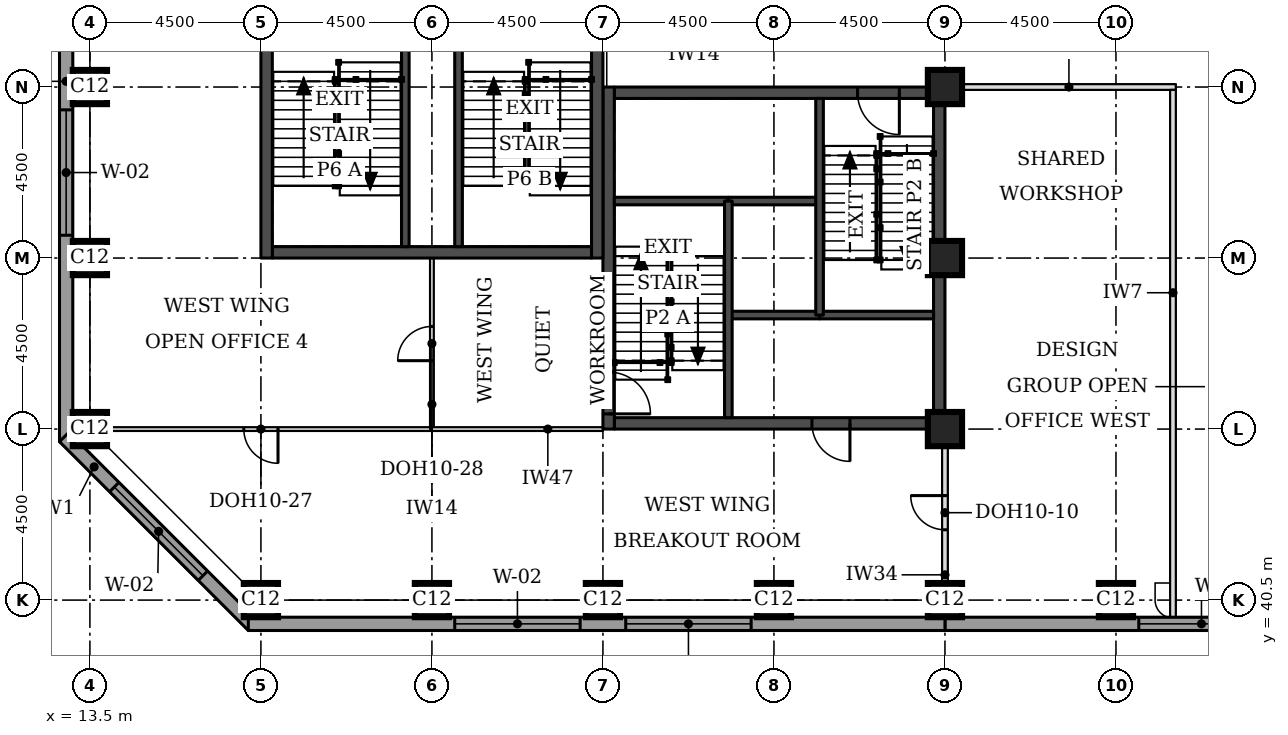
"""IFC4 building model, lengths in metres.
Left out: names, types, materials, properties, quantities, classifications, styles, units other than length and angle.
Written with IfcOpenShell. Run it as: python <this file> out.ifc"""

import sys

from ifc_helpers import new_model, si_unit, direction, frame, frame_2d, origin, origin_2d, place, context, subcontext, project, spatial, rectangle, extrude, element, fill, save


model = new_model("IFC4")
c1 = context("Model", 3, precision=1e-05, world=origin(), true_north=direction((0.0, 1.0)))
c2 = subcontext(c1, "Body", "Model", "MODEL_VIEW")
j1 = project(units=[si_unit("LENGTHUNIT", "METRE"), si_unit("PLANEANGLEUNIT", "RADIAN")], contexts=[c1])
p1 = place(None, origin())
s1 = spatial("IfcSite", under=j1, at=p1, CompositionType="ELEMENT")
p2 = place(p1, origin())
s2 = spatial("IfcBuilding", under=s1, at=p2, CompositionType="ELEMENT")
p3 = place(p2, frame((0.0, 0.0, 223.0)))
s3 = spatial("IfcBuildingStorey", under=s2, at=p3, CompositionType="ELEMENT", Elevation=223.0)
for number, where, z_axis, x_axis in (
    (1, (18.0, 40.5, 0.0), (0.0, 0.0, 1.0), (1.0, 0.0, 0.0)),
    (2, (22.5, 40.5, 0.0), (0.0, 0.0, 1.0), (1.0, 0.0, 0.0)),
    (3, (27.0, 40.5, 0.0), (0.0, 0.0, 1.0), (1.0, 0.0, 0.0)),
    (4, (31.5, 40.5, 0.0), (0.0, 0.0, 1.0), (1.0, 0.0, 0.0)),
    (5, (36.0, 40.5, 0.0), (0.0, 0.0, 1.0), (1.0, 0.0, 0.0)),
    (6, (40.5, 40.5, 0.0), (0.0, 0.0, 1.0), (1.0, 0.0, 0.0)),
    (7, (13.5, 45.0, 0.0), (0.0, 0.0, 1.0), (1.0, 0.0, 0.0)),
    (8, (36.0, 45.0, 0.0), (0.0, 0.0, 1.0), (1.0, 0.0, 0.0)),
    (9, (13.5, 49.5, 0.0), (0.0, 0.0, 1.0), (1.0, 0.0, 0.0)),
    (10, (36.0, 49.5, 0.0), (0.0, 0.0, 1.0), (1.0, 0.0, 0.0)),
    (11, (13.5, 54.0, 0.0), (0.0, 0.0, 1.0), (1.0, 0.0, 0.0)),
    (12, (36.0, 54.0, 0.0), (0.0, 0.0, 1.0), (1.0, 0.0, 0.0)),
):
    element("IfcColumn", number, at=place(p3, frame(where, z_axis=z_axis, x_axis=x_axis)), inside=s3, PredefinedType="COLUMN", context=c2, shape_type="SweptSolid", body=[
        extrude(rectangle(XDim=0.9, YDim=0.9, at=origin_2d()), origin(), (0.0, 0.0, 1.0), 3.7),
    ])
p4 = place(p3, frame((27.3, 45.15, 0.0), z_axis=(0.0, 0.0, 1.0), x_axis=(1.0, 0.0, 0.0)))
e13 = element("IfcWall", 13, at=p4, inside=s3, PredefinedType="SHEAR", context=c2, shape_type="SweptSolid", body=[
    extrude(rectangle(XDim=8.4, YDim=0.3, at=frame_2d((4.2, 0.0))), origin(), (0.0, 0.0, 1.0), 3.7),
])
p5 = place(p4, frame((5.2, 0.0, 0.0)))
e14 = element("IfcOpeningElement", 14, at=p5, cuts=e13, PredefinedType="OPENING", context=c2, shape_type="SweptSolid", body=[
    extrude(rectangle(XDim=1.0, YDim=2.1, at=frame_2d((0.5, 1.05))), frame((0.0, 0.16, 0.0), z_axis=(0.0, -1.0, 0.0), x_axis=(1.0, 0.0, 0.0)), (0.0, 0.0, 1.0), 0.32),
])
p6 = place(p3, frame((27.3, 53.85, 0.0), z_axis=(0.0, 0.0, 1.0), x_axis=(1.0, 0.0, 0.0)))
e15 = element("IfcWall", 15, at=p6, inside=s3, PredefinedType="SHEAR", context=c2, shape_type="SweptSolid", body=[
    extrude(rectangle(XDim=8.4, YDim=0.3, at=frame_2d((4.2, 0.0))), origin(), (0.0, 0.0, 1.0), 3.7),
])
p7 = place(p6, frame((6.4, 0.0, 0.0)))
e16 = element("IfcOpeningElement", 16, at=p7, cuts=e15, PredefinedType="OPENING", context=c2, shape_type="SweptSolid", body=[
    extrude(rectangle(XDim=1.1, YDim=2.1, at=frame_2d((0.55, 1.05))), frame((0.0, 0.16, 0.0), z_axis=(0.0, -1.0, 0.0), x_axis=(1.0, 0.0, 0.0)), (0.0, 0.0, 1.0), 0.32),
])
p8 = place(p3, frame((27.15, 45.0, 0.0), z_axis=(0.0, 0.0, 1.0), x_axis=(0.0, 1.0, 0.0)))
e17 = element("IfcWall", 17, at=p8, inside=s3, PredefinedType="SHEAR", context=c2, shape_type="SweptSolid", body=[
    extrude(rectangle(XDim=9.0, YDim=0.3, at=frame_2d((4.5, 0.0))), origin(), (0.0, 0.0, 1.0), 3.7),
])
p9 = place(p8, frame((0.4, 0.0, 0.0)))
e18 = element("IfcOpeningElement", 18, at=p9, cuts=e17, PredefinedType="OPENING", context=c2, shape_type="SweptSolid", body=[
    extrude(rectangle(XDim=1.1, YDim=2.1, at=frame_2d((0.55, 1.05))), frame((0.0, 0.16, 0.0), z_axis=(0.0, -1.0, 0.0), x_axis=(1.0, 0.0, 0.0)), (0.0, 0.0, 1.0), 0.32),
])
p10 = place(p3, frame((35.85, 45.0, 0.0), z_axis=(0.0, 0.0, 1.0), x_axis=(0.0, 1.0, 0.0)))
e19 = element("IfcWall", 19, at=p10, inside=s3, PredefinedType="SHEAR", context=c2, shape_type="SweptSolid", body=[
    extrude(rectangle(XDim=9.0, YDim=0.3, at=frame_2d((4.5, 0.0))), origin(), (0.0, 0.0, 1.0), 3.7),
])
p11 = place(p3, frame((18.3, 49.65, 0.0), z_axis=(0.0, 0.0, 1.0), x_axis=(1.0, 0.0, 0.0)))
e20 = element("IfcWall", 20, at=p11, inside=s3, PredefinedType="SHEAR", context=c2, shape_type="SweptSolid", body=[
    extrude(rectangle(XDim=8.4, YDim=0.3, at=frame_2d((4.2, 0.0))), origin(), (0.0, 0.0, 1.0), 3.7),
])
p12 = place(p3, frame((18.15, 49.5, 0.0), z_axis=(0.0, 0.0, 1.0), x_axis=(0.0, 1.0, 0.0)))
e21 = element("IfcWall", 21, at=p12, inside=s3, PredefinedType="SHEAR", context=c2, shape_type="SweptSolid", body=[
    extrude(rectangle(XDim=9.0, YDim=0.3, at=frame_2d((4.5, 0.0))), origin(), (0.0, 0.0, 1.0), 3.7),
])
p13 = place(p3, frame((26.85, 49.5, 0.0), z_axis=(0.0, 0.0, 1.0), x_axis=(0.0, 1.0, 0.0)))
e22 = element("IfcWall", 22, at=p13, inside=s3, PredefinedType="SHEAR", context=c2, shape_type="SweptSolid", body=[
    extrude(rectangle(XDim=9.0, YDim=0.3, at=frame_2d((4.5, 0.0))), origin(), (0.0, 0.0, 1.0), 3.7),
])
p14 = place(p13, frame((6.6, 0.0, 0.0)))
e23 = element("IfcOpeningElement", 23, at=p14, cuts=e22, PredefinedType="OPENING", context=c2, shape_type="SweptSolid", body=[
    extrude(rectangle(XDim=1.8, YDim=2.1, at=frame_2d((0.9, 1.05))), frame((0.0, 0.16, 0.0), z_axis=(0.0, -1.0, 0.0), x_axis=(1.0, 0.0, 0.0)), (0.0, 0.0, 1.0), 0.32),
])
p15 = place(p3, frame((36.0, 39.875, 0.0), z_axis=(0.0, 0.0, 1.0), x_axis=(1.0, 0.0, 0.0)))
e24 = element("IfcWall", 24, at=p15, inside=s3, PredefinedType="STANDARD", context=c2, shape_type="SweptSolid", body=[
    extrude(rectangle(XDim=36.331, YDim=0.35, at=frame_2d((18.166, 0.0))), origin(), (0.0, 0.0, 1.0), 3.525),
])
p16 = place(p15, frame((5.1, 0.0, 0.9)))
e25 = element("IfcOpeningElement", 25, at=p16, cuts=e24, PredefinedType="OPENING", context=c2, shape_type="SweptSolid", body=[
    extrude(rectangle(XDim=3.3, YDim=1.9, at=frame_2d((1.65, 0.95))), frame((0.0, 0.185, 0.0), z_axis=(0.0, -1.0, 0.0), x_axis=(1.0, 0.0, 0.0)), (0.0, 0.0, 1.0), 0.37),
])
p17 = place(p15, frame((9.6, 0.0, 0.9)))
e26 = element("IfcOpeningElement", 26, at=p17, cuts=e24, PredefinedType="OPENING", context=c2, shape_type="SweptSolid", body=[
    extrude(rectangle(XDim=3.3, YDim=1.9, at=frame_2d((1.65, 0.95))), frame((0.0, 0.185, 0.0), z_axis=(0.0, -1.0, 0.0), x_axis=(1.0, 0.0, 0.0)), (0.0, 0.0, 1.0), 0.37),
])
p18 = place(p15, frame((14.1, 0.0, 0.9)))
e27 = element("IfcOpeningElement", 27, at=p18, cuts=e24, PredefinedType="OPENING", context=c2, shape_type="SweptSolid", body=[
    extrude(rectangle(XDim=3.3, YDim=1.9, at=frame_2d((1.65, 0.95))), frame((0.0, 0.185, 0.0), z_axis=(0.0, -1.0, 0.0), x_axis=(1.0, 0.0, 0.0)), (0.0, 0.0, 1.0), 0.37),
])
p19 = place(p15, frame((18.6, 0.0, 0.9)))
e28 = element("IfcOpeningElement", 28, at=p19, cuts=e24, PredefinedType="OPENING", context=c2, shape_type="SweptSolid", body=[
    extrude(rectangle(XDim=3.3, YDim=1.9, at=frame_2d((1.65, 0.95))), frame((0.0, 0.185, 0.0), z_axis=(0.0, -1.0, 0.0), x_axis=(1.0, 0.0, 0.0)), (0.0, 0.0, 1.0), 0.37),
])
p20 = place(p15, frame((23.1, 0.0, 0.9)))
e29 = element("IfcOpeningElement", 29, at=p20, cuts=e24, PredefinedType="OPENING", context=c2, shape_type="SweptSolid", body=[
    extrude(rectangle(XDim=3.3, YDim=1.9, at=frame_2d((1.65, 0.95))), frame((0.0, 0.185, 0.0), z_axis=(0.0, -1.0, 0.0), x_axis=(1.0, 0.0, 0.0)), (0.0, 0.0, 1.0), 0.37),
])
p21 = place(p15, frame((27.6, 0.0, 0.9)))
e30 = element("IfcOpeningElement", 30, at=p21, cuts=e24, PredefinedType="OPENING", context=c2, shape_type="SweptSolid", body=[
    extrude(rectangle(XDim=3.3, YDim=1.9, at=frame_2d((1.65, 0.95))), frame((0.0, 0.185, 0.0), z_axis=(0.0, -1.0, 0.0), x_axis=(1.0, 0.0, 0.0)), (0.0, 0.0, 1.0), 0.37),
])
p22 = place(p3, frame((12.875, 58.831, 0.0), z_axis=(0.0, 0.0, 1.0), x_axis=(0.0, -1.0, 0.0)))
e31 = element("IfcWall", 31, at=p22, inside=s3, PredefinedType="STANDARD", context=c2, shape_type="SweptSolid", body=[
    extrude(rectangle(XDim=14.163, YDim=0.35, at=frame_2d((7.081, 0.0))), origin(), (0.0, 0.0, 1.0), 3.525),
])
p23 = place(p22, frame((5.431, 0.0, 0.9)))
e32 = element("IfcOpeningElement", 32, at=p23, cuts=e31, PredefinedType="OPENING", context=c2, shape_type="SweptSolid", body=[
    extrude(rectangle(XDim=3.3, YDim=1.9, at=frame_2d((1.65, 0.95))), frame((0.0, 0.185, 0.0), z_axis=(0.0, -1.0, 0.0), x_axis=(1.0, 0.0, 0.0)), (0.0, 0.0, 1.0), 0.37),
])
p24 = place(p3, frame((12.824, 44.792, 0.0), z_axis=(0.0, 0.0, 1.0), x_axis=(0.707106781187, -0.707106781187, 0.0)))
e33 = element("IfcWall", 33, at=p24, inside=s3, PredefinedType="STANDARD", context=c2, shape_type="SweptSolid", body=[
    extrude(rectangle(XDim=7.027, YDim=0.35, at=frame_2d((3.513, 0.0))), origin(), (0.0, 0.0, 1.0), 3.525),
])
p25 = place(p24, frame((1.863, 0.0, 0.9)))
e34 = element("IfcOpeningElement", 34, at=p25, cuts=e33, PredefinedType="OPENING", context=c2, shape_type="SweptSolid", body=[
    extrude(rectangle(XDim=3.3, YDim=1.9, at=frame_2d((1.65, 0.95))), frame((0.0, 0.185, 0.0), z_axis=(0.0, -1.0, 0.0), x_axis=(1.0, 0.0, 0.0)), (0.0, 0.0, 1.0), 0.37),
])
p26 = place(p3, frame((17.669, 39.875, 0.0), z_axis=(0.0, 0.0, 1.0), x_axis=(1.0, 0.0, 0.0)))
e35 = element("IfcWall", 35, at=p26, inside=s3, PredefinedType="STANDARD", context=c2, shape_type="SweptSolid", body=[
    extrude(rectangle(XDim=18.331, YDim=0.35, at=frame_2d((9.166, 0.0))), origin(), (0.0, 0.0, 1.0), 3.525),
])
p27 = place(p26, frame((5.431, 0.0, 0.9)))
e36 = element("IfcOpeningElement", 36, at=p27, cuts=e35, PredefinedType="OPENING", context=c2, shape_type="SweptSolid", body=[
    extrude(rectangle(XDim=3.3, YDim=1.9, at=frame_2d((1.65, 0.95))), frame((0.0, 0.185, 0.0), z_axis=(0.0, -1.0, 0.0), x_axis=(1.0, 0.0, 0.0)), (0.0, 0.0, 1.0), 0.37),
])
p28 = place(p26, frame((9.931, 0.0, 0.9)))
e37 = element("IfcOpeningElement", 37, at=p28, cuts=e35, PredefinedType="OPENING", context=c2, shape_type="SweptSolid", body=[
    extrude(rectangle(XDim=3.3, YDim=1.9, at=frame_2d((1.65, 0.95))), frame((0.0, 0.185, 0.0), z_axis=(0.0, -1.0, 0.0), x_axis=(1.0, 0.0, 0.0)), (0.0, 0.0, 1.0), 0.37),
])
p29 = place(p3, frame((36.45, 54.0, 0.0), z_axis=(0.0, 0.0, 1.0), x_axis=(1.0, 0.0, 0.0)))
e38 = element("IfcWall", 38, at=p29, inside=s3, PredefinedType="PARTITIONING", context=c2, shape_type="SweptSolid", body=[
    extrude(rectangle(XDim=5.625, YDim=0.15, at=frame_2d((2.812, 0.0))), origin(), (0.0, 0.0, 1.0), 3.55),
])
p30 = place(p3, frame((42.0, 40.05, 0.0), z_axis=(0.0, 0.0, 1.0), x_axis=(0.0, 1.0, 0.0)))
e39 = element("IfcWall", 39, at=p30, inside=s3, PredefinedType="PARTITIONING", context=c2, shape_type="SweptSolid", body=[
    extrude(rectangle(XDim=13.875, YDim=0.15, at=frame_2d((6.938, 0.0))), origin(), (0.0, 0.0, 1.0), 3.55),
])
p31 = place(p3, frame((36.0, 40.95, 0.0), z_axis=(0.0, 0.0, 1.0), x_axis=(0.0, 1.0, 0.0)))
e40 = element("IfcWall", 40, at=p31, inside=s3, PredefinedType="PARTITIONING", context=c2, shape_type="SweptSolid", body=[
    extrude(rectangle(XDim=3.63, YDim=0.15, at=frame_2d((1.815, 0.0))), origin(), (0.0, 0.0, 1.0), 2.8),
])
p32 = place(p31, frame((1.4, 0.0, 0.0)))
e41 = element("IfcOpeningElement", 41, at=p32, cuts=e40, PredefinedType="OPENING", context=c2, shape_type="SweptSolid", body=[
    extrude(rectangle(XDim=0.9, YDim=2.1, at=frame_2d((0.45, 1.05))), frame((0.0, 0.085, 0.0), z_axis=(0.0, -1.0, 0.0), x_axis=(1.0, 0.0, 0.0)), (0.0, 0.0, 1.0), 0.17),
])
p33 = place(p3, frame((22.5, 45.0, 0.0), z_axis=(0.0, 0.0, 1.0), x_axis=(-1.0, 0.0, 0.0)))
e42 = element("IfcWall", 42, at=p33, inside=s3, PredefinedType="PARTITIONING", context=c2, shape_type="SweptSolid", body=[
    extrude(rectangle(XDim=9.0, YDim=0.1, at=frame_2d((4.5, 0.0))), origin(), (0.0, 0.0, 1.0), 2.55),
])
p34 = place(p33, frame((4.05, 0.0, 0.0)))
e43 = element("IfcOpeningElement", 43, at=p34, cuts=e42, PredefinedType="OPENING", context=c2, shape_type="SweptSolid", body=[
    extrude(rectangle(XDim=0.9, YDim=2.1, at=frame_2d((0.45, 1.05))), frame((0.0, 0.06, 0.0), z_axis=(0.0, -1.0, 0.0), x_axis=(1.0, 0.0, 0.0)), (0.0, 0.0, 1.0), 0.12),
])
p35 = place(p3, frame((22.5, 49.5, 0.0), z_axis=(0.0, 0.0, 1.0), x_axis=(0.0, -1.0, 0.0)))
e44 = element("IfcWall", 44, at=p35, inside=s3, PredefinedType="PARTITIONING", context=c2, shape_type="SweptSolid", body=[
    extrude(rectangle(XDim=4.5, YDim=0.1, at=frame_2d((2.25, 0.0))), origin(), (0.0, 0.0, 1.0), 3.55),
])
p36 = place(p35, frame((1.8, 0.0, 0.0)))
e45 = element("IfcOpeningElement", 45, at=p36, cuts=e44, PredefinedType="OPENING", context=c2, shape_type="SweptSolid", body=[
    extrude(rectangle(XDim=0.9, YDim=2.1, at=frame_2d((0.45, 1.05))), frame((0.0, 0.06, 0.0), z_axis=(0.0, -1.0, 0.0), x_axis=(1.0, 0.0, 0.0)), (0.0, 0.0, 1.0), 0.12),
])
p37 = place(p3, frame((22.5, 45.0, 0.0), z_axis=(0.0, 0.0, 1.0), x_axis=(1.0, 0.0, 0.0)))
e46 = element("IfcWall", 46, at=p37, inside=s3, PredefinedType="PARTITIONING", context=c2, shape_type="SweptSolid", body=[
    extrude(rectangle(XDim=4.5, YDim=0.1, at=frame_2d((2.25, 0.0))), origin(), (0.0, 0.0, 1.0), 2.55),
])
p38 = place(p3, frame((30.3, 48.0, 0.0), z_axis=(0.0, 0.0, 1.0), x_axis=(1.0, 0.0, 0.0)))
e47 = element("IfcWall", 47, at=p38, inside=s3, PredefinedType="SOLIDWALL", context=c2, shape_type="SweptSolid", body=[
    extrude(rectangle(XDim=2.4, YDim=0.2, at=frame_2d((1.2, 0.0))), origin(), (0.0, 0.0, 1.0), 3.55),
])
p39 = place(p3, frame((32.7, 48.0, 0.0), z_axis=(0.0, 0.0, 1.0), x_axis=(1.0, 0.0, 0.0)))
e48 = element("IfcWall", 48, at=p39, inside=s3, PredefinedType="SOLIDWALL", context=c2, shape_type="SweptSolid", body=[
    extrude(rectangle(XDim=3.0, YDim=0.2, at=frame_2d((1.5, 0.0))), origin(), (0.0, 0.0, 1.0), 3.55),
])
p40 = place(p3, frame((30.3, 51.0, 0.0), z_axis=(0.0, 0.0, 1.0), x_axis=(1.0, 0.0, 0.0)))
e49 = element("IfcWall", 49, at=p40, inside=s3, PredefinedType="SOLIDWALL", context=c2, shape_type="SweptSolid", body=[
    extrude(rectangle(XDim=2.4, YDim=0.2, at=frame_2d((1.2, 0.0))), origin(), (0.0, 0.0, 1.0), 3.7),
])
p41 = place(p3, frame((27.3, 51.0, 0.0), z_axis=(0.0, 0.0, 1.0), x_axis=(1.0, 0.0, 0.0)))
e50 = element("IfcWall", 50, at=p41, inside=s3, PredefinedType="SOLIDWALL", context=c2, shape_type="SweptSolid", body=[
    extrude(rectangle(XDim=3.0, YDim=0.2, at=frame_2d((1.5, 0.0))), origin(), (0.0, 0.0, 1.0), 3.55),
])
for number, where, z_axis, x_axis in (
    (51, (30.3, 45.3, 0.0), (0.0, 0.0, 1.0), (0.0, 1.0, 0.0)),
    (52, (32.7, 48.0, 0.0), (0.0, 0.0, 1.0), (0.0, 1.0, 0.0)),
):
    element("IfcWall", number, at=place(p3, frame(where, z_axis=z_axis, x_axis=x_axis)), inside=s3, PredefinedType="SOLIDWALL", context=c2, shape_type="SweptSolid", body=[
        extrude(rectangle(XDim=5.7, YDim=0.2, at=frame_2d((2.85, 0.0))), origin(), (0.0, 0.0, 1.0), 3.55),
    ])
for number, where, z_axis, x_axis in (
    (53, (21.8, 49.8, 0.0), (0.0, 0.0, 1.0), (0.0, 1.0, 0.0)),
    (54, (23.2, 49.8, 0.0), (0.0, 0.0, 1.0), (0.0, 1.0, 0.0)),
):
    element("IfcWall", number, at=place(p3, frame(where, z_axis=z_axis, x_axis=x_axis)), inside=s3, PredefinedType="SOLIDWALL", context=c2, shape_type="SweptSolid", body=[
        extrude(rectangle(XDim=6.05, YDim=0.2, at=frame_2d((3.025, 0.0))), origin(), (0.0, 0.0, 1.0), 3.55),
    ])
p42 = place(p16, origin())
e55 = element("IfcWindow", 55, at=p42, inside=s3, PartitioningType="SINGLE_PANEL", PredefinedType="WINDOW", context=c2, shape_type="SweptSolid", body=[
    extrude(rectangle(XDim=3.3, YDim=1.9, at=frame_2d((1.65, 0.95))), frame((0.0, 0.085, 0.0), z_axis=(0.0, -1.0, 0.0), x_axis=(1.0, 0.0, 0.0)), (0.0, 0.0, 1.0), 0.06),
])
fill(e25, e55)
p43 = place(p23, origin())
e56 = element("IfcWindow", 56, at=p43, inside=s3, PartitioningType="SINGLE_PANEL", PredefinedType="WINDOW", context=c2, shape_type="SweptSolid", body=[
    extrude(rectangle(XDim=3.3, YDim=1.9, at=frame_2d((1.65, 0.95))), frame((0.0, 0.085, 0.0), z_axis=(0.0, -1.0, 0.0), x_axis=(1.0, 0.0, 0.0)), (0.0, 0.0, 1.0), 0.06),
])
fill(e32, e56)
p44 = place(p25, origin())
e57 = element("IfcWindow", 57, at=p44, inside=s3, PartitioningType="SINGLE_PANEL", PredefinedType="WINDOW", context=c2, shape_type="SweptSolid", body=[
    extrude(rectangle(XDim=3.3, YDim=1.9, at=frame_2d((1.65, 0.95))), frame((0.0, 0.085, 0.0), z_axis=(0.0, -1.0, 0.0), x_axis=(1.0, 0.0, 0.0)), (0.0, 0.0, 1.0), 0.06),
])
fill(e34, e57)
p45 = place(p27, origin())
e58 = element("IfcWindow", 58, at=p45, inside=s3, PartitioningType="SINGLE_PANEL", PredefinedType="WINDOW", context=c2, shape_type="SweptSolid", body=[
    extrude(rectangle(XDim=3.3, YDim=1.9, at=frame_2d((1.65, 0.95))), frame((0.0, 0.085, 0.0), z_axis=(0.0, -1.0, 0.0), x_axis=(1.0, 0.0, 0.0)), (0.0, 0.0, 1.0), 0.06),
])
fill(e36, e58)
p46 = place(p28, origin())
e59 = element("IfcWindow", 59, at=p46, inside=s3, PartitioningType="SINGLE_PANEL", PredefinedType="WINDOW", context=c2, shape_type="SweptSolid", body=[
    extrude(rectangle(XDim=3.3, YDim=1.9, at=frame_2d((1.65, 0.95))), frame((0.0, 0.085, 0.0), z_axis=(0.0, -1.0, 0.0), x_axis=(1.0, 0.0, 0.0)), (0.0, 0.0, 1.0), 0.06),
])
fill(e37, e59)
p47 = place(p32, origin())
e60 = element("IfcDoor", 60, at=p47, inside=s3, OperationType="SINGLE_SWING_RIGHT", PredefinedType="DOOR", context=c2, shape_type="SweptSolid", body=[
    extrude(rectangle(XDim=0.9, YDim=2.1, at=frame_2d((0.45, 1.05))), frame((0.0, 0.025, 0.0), z_axis=(0.0, -1.0, 0.0), x_axis=(1.0, 0.0, 0.0)), (0.0, 0.0, 1.0), 0.05),
])
fill(e41, e60)
p48 = place(p34, origin())
e61 = element("IfcDoor", 61, at=p48, inside=s3, OperationType="SINGLE_SWING_LEFT", PredefinedType="DOOR", context=c2, shape_type="SweptSolid", body=[
    extrude(rectangle(XDim=0.9, YDim=2.1, at=frame_2d((0.45, 1.05))), frame((0.0, 0.025, 0.0), z_axis=(0.0, -1.0, 0.0), x_axis=(1.0, 0.0, 0.0)), (0.0, 0.0, 1.0), 0.05),
])
fill(e43, e61)
p49 = place(p36, frame((0.9, 0.0, 0.0), z_axis=(0.0, 0.0, 1.0), x_axis=(-1.0, 0.0, 0.0)))
e62 = element("IfcDoor", 62, at=p49, inside=s3, OperationType="SINGLE_SWING_LEFT", PredefinedType="DOOR", context=c2, shape_type="SweptSolid", body=[
    extrude(rectangle(XDim=0.9, YDim=2.1, at=frame_2d((0.45, 1.05))), frame((0.0, 0.025, 0.0), z_axis=(0.0, -1.0, 0.0), x_axis=(1.0, 0.0, 0.0)), (0.0, 0.0, 1.0), 0.05),
])
fill(e45, e62)
p50 = place(p9, frame((1.1, 0.0, 0.0), z_axis=(0.0, 0.0, 1.0), x_axis=(-1.0, 0.0, 0.0)))
e63 = element("IfcDoor", 63, at=p50, inside=s3, OperationType="SINGLE_SWING_RIGHT", PredefinedType="DOOR", context=c2, shape_type="SweptSolid", body=[
    extrude(rectangle(XDim=1.1, YDim=2.1, at=frame_2d((0.55, 1.05))), frame((0.0, 0.025, 0.0), z_axis=(0.0, -1.0, 0.0), x_axis=(1.0, 0.0, 0.0)), (0.0, 0.0, 1.0), 0.05),
])
fill(e18, e63)
p51 = place(p7, frame((1.1, 0.0, 0.0), z_axis=(0.0, 0.0, 1.0), x_axis=(-1.0, 0.0, 0.0)))
e64 = element("IfcDoor", 64, at=p51, inside=s3, OperationType="SINGLE_SWING_LEFT", PredefinedType="DOOR", context=c2, shape_type="SweptSolid", body=[
    extrude(rectangle(XDim=1.1, YDim=2.1, at=frame_2d((0.55, 1.05))), frame((0.0, 0.025, 0.0), z_axis=(0.0, -1.0, 0.0), x_axis=(1.0, 0.0, 0.0)), (0.0, 0.0, 1.0), 0.05),
])
fill(e16, e64)
p52 = place(p5, frame((1.0, 0.0, 0.0), z_axis=(0.0, 0.0, 1.0), x_axis=(-1.0, 0.0, 0.0)))
e65 = element("IfcDoor", 65, at=p52, inside=s3, OperationType="SINGLE_SWING_LEFT", PredefinedType="DOOR", context=c2, shape_type="SweptSolid", body=[
    extrude(rectangle(XDim=1.0, YDim=2.1, at=frame_2d((0.5, 1.05))), frame((0.0, 0.025, 0.0), z_axis=(0.0, -1.0, 0.0), x_axis=(1.0, 0.0, 0.0)), (0.0, 0.0, 1.0), 0.05),
])
fill(e14, e65)
save(model, sys.argv[1])
